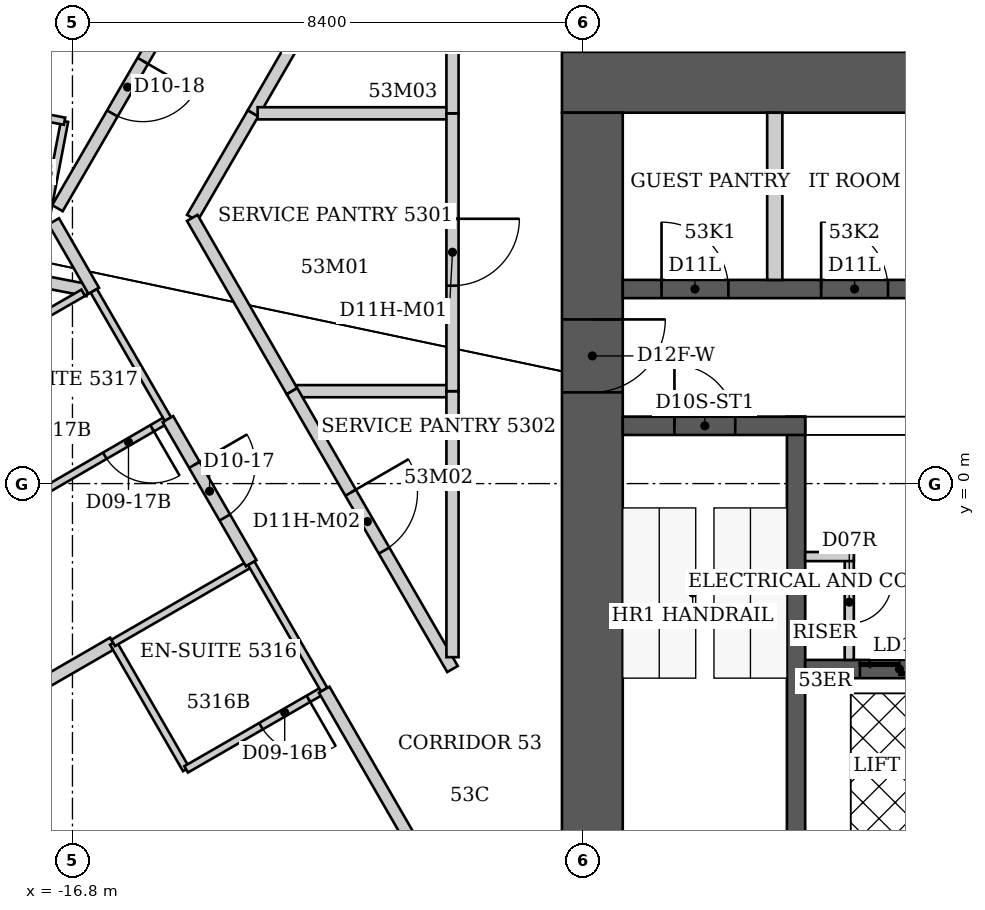
"""IFC4 building model, lengths in metres.
Left out: names, types, materials, properties, quantities, classifications, styles, units other than length and angle.
Written with IfcOpenShell. Run it as: python <this file> out.ifc"""

import sys

from ifc_helpers import new_model, si_unit, direction, frame, frame_2d, origin, place, context, subcontext, project, spatial, rectangle, extrude, element, fill, save


model = new_model("IFC4")
c1 = context("Model", 3, precision=1e-05, world=origin(), true_north=direction((0.0, 1.0)))
c2 = subcontext(c1, "Body", "Model", "MODEL_VIEW")
j1 = project(units=[si_unit("LENGTHUNIT", "METRE"), si_unit("PLANEANGLEUNIT", "RADIAN")], contexts=[c1])
p1 = place(None, origin())
s1 = spatial("IfcSite", under=j1, at=p1, CompositionType="ELEMENT")
p2 = place(p1, origin())
s2 = spatial("IfcBuilding", under=s1, at=p2, CompositionType="ELEMENT")
p3 = place(p2, frame((0.0, 0.0, 213.6)))
s3 = spatial("IfcBuildingStorey", under=s2, at=p3, CompositionType="ELEMENT", Elevation=213.6)
p4 = place(p3, frame((-8.75, 6.6, 0.0), z_axis=(0.0, 0.0, 1.0), x_axis=(1.0, 0.0, 0.0)))
e1 = element("IfcWall", 1, at=p4, inside=s3, PredefinedType="SHEAR", context=c2, shape_type="SweptSolid", body=[
    extrude(rectangle(XDim=17.5, YDim=1.0, at=frame_2d((8.75, 0.0))), origin(), (0.0, 0.0, 1.0), 3.8),
])
p5 = place(p4, frame((6.887, 0.0, 0.0)))
e2 = element("IfcOpeningElement", 2, at=p5, cuts=e1, PredefinedType="OPENING", context=c2, shape_type="SweptSolid", body=[
    extrude(rectangle(XDim=1.1, YDim=2.1, at=frame_2d((0.55, 1.05))), frame((0.0, 0.5, 0.0), z_axis=(0.0, -1.0, 0.0), x_axis=(1.0, 0.0, 0.0)), (0.0, 0.0, 1.0), 1.0),
])
p6 = place(p4, frame((9.512, 0.0, 0.0)))
e3 = element("IfcOpeningElement", 3, at=p6, cuts=e1, PredefinedType="OPENING", context=c2, shape_type="SweptSolid", body=[
    extrude(rectangle(XDim=1.1, YDim=2.1, at=frame_2d((0.55, 1.05))), frame((0.0, 0.5, 0.0), z_axis=(0.0, -1.0, 0.0), x_axis=(1.0, 0.0, 0.0)), (0.0, 0.0, 1.0), 1.0),
])
p7 = place(p4, frame((12.137, 0.0, 0.0)))
e4 = element("IfcOpeningElement", 4, at=p7, cuts=e1, PredefinedType="OPENING", context=c2, shape_type="SweptSolid", body=[
    extrude(rectangle(XDim=1.1, YDim=2.1, at=frame_2d((0.55, 1.05))), frame((0.0, 0.5, 0.0), z_axis=(0.0, -1.0, 0.0), x_axis=(1.0, 0.0, 0.0)), (0.0, 0.0, 1.0), 1.0),
])
p8 = place(p4, frame((14.762, 0.0, 0.0)))
e5 = element("IfcOpeningElement", 5, at=p8, cuts=e1, PredefinedType="OPENING", context=c2, shape_type="SweptSolid", body=[
    extrude(rectangle(XDim=1.1, YDim=2.1, at=frame_2d((0.55, 1.05))), frame((0.0, 0.5, 0.0), z_axis=(0.0, -1.0, 0.0), x_axis=(1.0, 0.0, 0.0)), (0.0, 0.0, 1.0), 1.0),
])
p9 = place(p3, frame((-8.25, -6.1, 0.0), z_axis=(0.0, 0.0, 1.0), x_axis=(0.0, 1.0, 0.0)))
e6 = element("IfcWall", 6, at=p9, inside=s3, PredefinedType="SHEAR", context=c2, shape_type="SweptSolid", body=[
    extrude(rectangle(XDim=12.2, YDim=1.0, at=frame_2d((6.1, 0.0))), origin(), (0.0, 0.0, 1.0), 3.8),
])
p10 = place(p9, frame((7.6, 0.0, 0.0)))
e7 = element("IfcOpeningElement", 7, at=p10, cuts=e6, PredefinedType="OPENING", context=c2, shape_type="SweptSolid", body=[
    extrude(rectangle(XDim=1.2, YDim=2.2, at=frame_2d((0.6, 1.1))), frame((0.0, 0.5, 0.0), z_axis=(0.0, -1.0, 0.0), x_axis=(1.0, 0.0, 0.0)), (0.0, 0.0, 1.0), 1.0),
])
p11 = place(p3, frame((-4.9, -6.1, 0.0), z_axis=(0.0, 0.0, 1.0), x_axis=(0.0, 1.0, 0.0)))
e8 = element("IfcWall", 8, at=p11, inside=s3, PredefinedType="SHEAR", context=c2, shape_type="SweptSolid", body=[
    extrude(rectangle(XDim=7.2, YDim=0.3, at=frame_2d((3.6, 0.0))), origin(), (0.0, 0.0, 1.0), 3.8),
])
p12 = place(p3, frame((-7.75, 0.95, 0.0), z_axis=(0.0, 0.0, 1.0), x_axis=(1.0, 0.0, 0.0)))
e9 = element("IfcWall", 9, at=p12, inside=s3, PredefinedType="SHEAR", context=c2, shape_type="SweptSolid", body=[
    extrude(rectangle(XDim=3.0, YDim=0.3, at=frame_2d((1.5, 0.0))), origin(), (0.0, 0.0, 1.0), 3.8),
])
p13 = place(p12, frame((0.85, 0.0, 0.0)))
e10 = element("IfcOpeningElement", 10, at=p13, cuts=e9, PredefinedType="OPENING", context=c2, shape_type="SweptSolid", body=[
    extrude(rectangle(XDim=1.0, YDim=2.2, at=frame_2d((0.5, 1.1))), frame((0.0, 0.15, 0.0), z_axis=(0.0, -1.0, 0.0), x_axis=(1.0, 0.0, 0.0)), (0.0, 0.0, 1.0), 0.3),
])
p14 = place(p3, frame((-4.75, -3.05, 0.0), z_axis=(0.0, 0.0, 1.0), x_axis=(1.0, 0.0, 0.0)))
e11 = element("IfcWall", 11, at=p14, inside=s3, PredefinedType="SHEAR", context=c2, shape_type="SweptSolid", body=[
    extrude(rectangle(XDim=3.1, YDim=0.3, at=frame_2d((1.55, 0.0))), origin(), (0.0, 0.0, 1.0), 3.8),
])
p15 = place(p14, frame((0.9, 0.0, 0.0)))
e12 = element("IfcOpeningElement", 12, at=p15, cuts=e11, PredefinedType="OPENING", context=c2, shape_type="SweptSolid", body=[
    extrude(rectangle(XDim=1.3, YDim=2.1, at=frame_2d((0.65, 1.05))), frame((0.0, 0.15, 0.0), z_axis=(0.0, -1.0, 0.0), x_axis=(1.0, 0.0, 0.0)), (0.0, 0.0, 1.0), 0.3),
])
p16 = place(p3, frame((-7.75, 3.2, 0.0), z_axis=(0.0, 0.0, 1.0), x_axis=(1.0, 0.0, 0.0)))
e13 = element("IfcWall", 13, at=p16, inside=s3, PredefinedType="SHEAR", context=c2, shape_type="SweptSolid", body=[
    extrude(rectangle(XDim=15.5, YDim=0.3, at=frame_2d((7.75, 0.0))), origin(), (0.0, 0.0, 1.0), 3.8),
])
p17 = place(p16, frame((0.637, 0.0, 0.0)))
e14 = element("IfcOpeningElement", 14, at=p17, cuts=e13, PredefinedType="OPENING", context=c2, shape_type="SweptSolid", body=[
    extrude(rectangle(XDim=1.1, YDim=2.2, at=frame_2d((0.55, 1.1))), frame((0.0, 0.15, 0.0), z_axis=(0.0, -1.0, 0.0), x_axis=(1.0, 0.0, 0.0)), (0.0, 0.0, 1.0), 0.3),
])
p18 = place(p16, frame((3.262, 0.0, 0.0)))
e15 = element("IfcOpeningElement", 15, at=p18, cuts=e13, PredefinedType="OPENING", context=c2, shape_type="SweptSolid", body=[
    extrude(rectangle(XDim=1.1, YDim=2.2, at=frame_2d((0.55, 1.1))), frame((0.0, 0.15, 0.0), z_axis=(0.0, -1.0, 0.0), x_axis=(1.0, 0.0, 0.0)), (0.0, 0.0, 1.0), 0.3),
])
p19 = place(p3, frame((-5.25, 3.35, 0.0), z_axis=(0.0, 0.0, 1.0), x_axis=(0.0, 1.0, 0.0)))
e16 = element("IfcWall", 16, at=p19, inside=s3, PredefinedType="PARTITIONING", context=c2, shape_type="SweptSolid", body=[
    extrude(rectangle(XDim=2.75, YDim=0.25, at=frame_2d((1.375, 0.0))), origin(), (0.0, 0.0, 1.0), 3.8),
])
p20 = place(p3, frame((-21.116, -5.5, 0.0), z_axis=(0.0, 0.0, 1.0), x_axis=(0.865919350456, 0.50018364478, 0.0)))
e17 = element("IfcWall", 17, at=p20, inside=s3, PredefinedType="PARTITIONING", context=c2, shape_type="SweptSolid", body=[
    extrude(rectangle(XDim=5.758, YDim=0.2, at=frame_2d((2.879, 0.0))), origin(), (0.0, 0.0, 1.0), 3.64),
])
p21 = place(p3, frame((-17.54, -0.28, 0.0), z_axis=(0.0, 0.0, 1.0), x_axis=(0.86498992408, 0.501789229896, 0.0)))
e18 = element("IfcWall", 18, at=p21, inside=s3, PredefinedType="PARTITIONING", context=c2, shape_type="SweptSolid", body=[
    extrude(rectangle(XDim=2.671, YDim=0.12, at=frame_2d((1.335, 0.0))), origin(), (0.0, 0.0, 1.0), 3.64),
])
p22 = place(p21, frame((1.47, 0.0, 0.0)))
e19 = element("IfcOpeningElement", 19, at=p22, cuts=e18, PredefinedType="OPENING", context=c2, shape_type="SweptSolid", body=[
    extrude(rectangle(XDim=0.9, YDim=2.03, at=frame_2d((0.45, 1.015))), frame((0.0, 0.06, 0.0), z_axis=(0.0, -1.0, 0.0), x_axis=(1.0, 0.0, 0.0)), (0.0, 0.0, 1.0), 0.12),
])
p23 = place(p3, frame((-17.43, 3.35, 0.0), z_axis=(0.0, 0.0, 1.0), x_axis=(0.188159009227, 0.982138578433, 0.0)))
e20 = element("IfcWall", 20, at=p23, inside=s3, PredefinedType="PARTITIONING", context=c2, shape_type="SweptSolid", body=[
    extrude(rectangle(XDim=2.657, YDim=0.12, at=frame_2d((1.329, 0.0))), origin(), (0.0, 0.0, 1.0), 3.64),
])
p24 = place(p3, frame((-17.43, 3.35, 0.0), z_axis=(0.0, 0.0, 1.0), x_axis=(0.981858463983, -0.189615286052, 0.0)))
e21 = element("IfcWall", 21, at=p24, inside=s3, PredefinedType="PARTITIONING", context=c2, shape_type="SweptSolid", body=[
    extrude(rectangle(XDim=0.896, YDim=0.2, at=frame_2d((0.448, 0.0))), origin(), (0.0, 0.0, 1.0), 3.64),
])
p25 = place(p3, frame((-17.108, 4.314, 0.0), z_axis=(0.0, 0.0, 1.0), x_axis=(0.498488506644, -0.866896307954, 0.0)))
e22 = element("IfcWall", 22, at=p25, inside=s3, PredefinedType="PARTITIONING", context=c2, shape_type="SweptSolid", body=[
    extrude(rectangle(XDim=1.319, YDim=0.2, at=frame_2d((0.66, 0.0))), origin(), (0.0, 0.0, 1.0), 3.64),
])
p26 = place(p3, frame((-16.93, 5.96, 0.0), z_axis=(0.0, 0.0, 1.0), x_axis=(-0.982097071605, 0.18837553436, 0.0)))
e23 = element("IfcWall", 23, at=p26, inside=s3, PredefinedType="PARTITIONING", context=c2, shape_type="SweptSolid", body=[
    extrude(rectangle(XDim=2.495, YDim=0.12, at=frame_2d((1.248, 0.0))), origin(), (0.0, 0.0, 1.0), 3.64),
])
p27 = place(p3, frame((-16.624, 3.138, 0.0), z_axis=(0.0, 0.0, 1.0), x_axis=(-0.866525185869, -0.499133351175, 0.0)))
e24 = element("IfcWall", 24, at=p27, inside=s3, PredefinedType="PARTITIONING", context=c2, shape_type="SweptSolid", body=[
    extrude(rectangle(XDim=2.5, YDim=0.12, at=frame_2d((1.25, 0.0))), origin(), (0.0, 0.0, 1.0), 3.038),
])
p28 = place(p3, frame((-16.45, 3.17, 0.0), z_axis=(0.0, 0.0, 1.0), x_axis=(0.500566296323, -0.865698205488, 0.0)))
e25 = element("IfcWall", 25, at=p28, inside=s3, PredefinedType="PARTITIONING", context=c2, shape_type="SweptSolid", body=[
    extrude(rectangle(XDim=2.437, YDim=0.12, at=frame_2d((1.219, 0.0))), origin(), (0.0, 0.0, 1.0), 3.64),
])
p29 = place(p3, frame((-16.13, -2.62, 0.0), z_axis=(0.0, 0.0, 1.0), x_axis=(0.499737123639, -0.866177122335, 0.0)))
e26 = element("IfcWall", 26, at=p29, inside=s3, PredefinedType="PARTITIONING", context=c2, shape_type="SweptSolid", body=[
    extrude(rectangle(XDim=2.401, YDim=0.12, at=frame_2d((1.201, 0.0))), origin(), (0.0, 0.0, 1.0), 3.64),
])
p30 = place(p3, frame((-16.13, -2.62, 0.0), z_axis=(0.0, 0.0, 1.0), x_axis=(0.866114241029, 0.499846097802, 0.0)))
e27 = element("IfcWall", 27, at=p30, inside=s3, PredefinedType="PARTITIONING", context=c2, shape_type="SweptSolid", body=[
    extrude(rectangle(XDim=2.621, YDim=0.12, at=frame_2d((1.311, 0.0))), origin(), (0.0, 0.0, 1.0), 3.64),
])
p31 = place(p3, frame((-15.23, 1.06, 0.0), z_axis=(0.0, 0.0, 1.0), x_axis=(0.500406860043, -0.865790375565, 0.0)))
e28 = element("IfcWall", 28, at=p31, inside=s3, PredefinedType="PARTITIONING", context=c2, shape_type="SweptSolid", body=[
    extrude(rectangle(XDim=2.738, YDim=0.2, at=frame_2d((1.369, 0.0))), origin(), (0.0, 0.0, 1.0), 3.64),
])
p32 = place(p31, frame((0.869, 0.0, 0.0)))
e29 = element("IfcOpeningElement", 29, at=p32, cuts=e28, PredefinedType="OPENING", context=c2, shape_type="SweptSolid", body=[
    extrude(rectangle(XDim=1.0, YDim=2.13, at=frame_2d((0.5, 1.065))), frame((0.0, 0.1, 0.0), z_axis=(0.0, -1.0, 0.0), x_axis=(1.0, 0.0, 0.0)), (0.0, 0.0, 1.0), 0.2),
])
p33 = place(p3, frame((-14.93, -4.7, 0.0), z_axis=(0.0, 0.0, 1.0), x_axis=(0.866114241029, 0.499846097802, 0.0)))
e30 = element("IfcWall", 30, at=p33, inside=s3, PredefinedType="PARTITIONING", context=c2, shape_type="SweptSolid", body=[
    extrude(rectangle(XDim=2.621, YDim=0.12, at=frame_2d((1.311, 0.0))), origin(), (0.0, 0.0, 1.0), 3.64),
])
p34 = place(p33, frame((1.421, 0.0, 0.0)))
e31 = element("IfcOpeningElement", 31, at=p34, cuts=e30, PredefinedType="OPENING", context=c2, shape_type="SweptSolid", body=[
    extrude(rectangle(XDim=0.9, YDim=2.03, at=frame_2d((0.45, 1.015))), frame((0.0, 0.06, 0.0), z_axis=(0.0, -1.0, 0.0), x_axis=(1.0, 0.0, 0.0)), (0.0, 0.0, 1.0), 0.12),
])
p35 = place(p3, frame((-14.83, 4.37, 0.0), z_axis=(0.0, 0.0, 1.0), x_axis=(0.502626855825, 0.864503466623, 0.0)))
e32 = element("IfcWall", 32, at=p35, inside=s3, PredefinedType="PARTITIONING", context=c2, shape_type="SweptSolid", body=[
    extrude(rectangle(XDim=1.99, YDim=0.2, at=frame_2d((0.995, 0.0))), origin(), (0.0, 0.0, 1.0), 3.64),
])
p36 = place(p3, frame((-14.74, 8.51, 0.0), z_axis=(0.0, 0.0, 1.0), x_axis=(-0.501513165407, -0.865150012959, 0.0)))
e33 = element("IfcWall", 33, at=p36, inside=s3, PredefinedType="PARTITIONING", context=c2, shape_type="SweptSolid", body=[
    extrude(rectangle(XDim=4.6, YDim=0.2, at=frame_2d((2.3, 0.0))), origin(), (0.0, 0.0, 1.0), 3.64),
])
p37 = place(p36, frame((1.8, 0.0, 0.0)))
e34 = element("IfcOpeningElement", 34, at=p37, cuts=e33, PredefinedType="OPENING", context=c2, shape_type="SweptSolid", body=[
    extrude(rectangle(XDim=1.0, YDim=2.13, at=frame_2d((0.5, 1.065))), frame((0.0, 0.1, 0.0), z_axis=(0.0, -1.0, 0.0), x_axis=(1.0, 0.0, 0.0)), (0.0, 0.0, 1.0), 0.2),
])
p38 = place(p3, frame((-13.86, -1.31, 0.0), z_axis=(0.0, 0.0, 1.0), x_axis=(0.499813401482, -0.866133109688, 0.0)))
e35 = element("IfcWall", 35, at=p38, inside=s3, PredefinedType="PARTITIONING", context=c2, shape_type="SweptSolid", body=[
    extrude(rectangle(XDim=2.401, YDim=0.12, at=frame_2d((1.201, 0.0))), origin(), (0.0, 0.0, 1.0), 3.64),
])
p39 = place(p3, frame((-13.83, 6.09, 0.0), z_axis=(0.0, 0.0, 1.0), x_axis=(0.500248310865, 0.865881993967, 0.0)))
e36 = element("IfcWall", 36, at=p39, inside=s3, PredefinedType="PARTITIONING", context=c2, shape_type="SweptSolid", body=[
    extrude(rectangle(XDim=5.278, YDim=0.2, at=frame_2d((2.639, 0.0))), origin(), (0.0, 0.0, 1.0), 3.64),
])
p40 = place(p3, frame((-13.755, 6.09, 0.0), z_axis=(0.0, 0.0, 1.0), x_axis=(1.0, 0.0, 0.0)))
e37 = element("IfcWall", 37, at=p40, inside=s3, PredefinedType="PARTITIONING", context=c2, shape_type="SweptSolid", body=[
    extrude(rectangle(XDim=3.195, YDim=0.2, at=frame_2d((1.597, 0.0))), origin(), (0.0, 0.0, 1.0), 3.64),
])
p41 = place(p3, frame((-13.19, 1.52, 0.0), z_axis=(0.0, 0.0, 1.0), x_axis=(-0.498775186059, 0.866731396554, 0.0)))
e38 = element("IfcWall", 38, at=p41, inside=s3, PredefinedType="PARTITIONING", context=c2, shape_type="SweptSolid", body=[
    extrude(rectangle(XDim=3.288, YDim=0.2, at=frame_2d((1.644, 0.0))), origin(), (0.0, 0.0, 1.0), 3.64),
])
p42 = place(p3, frame((-12.66, -3.39, 0.0), z_axis=(0.0, 0.0, 1.0), x_axis=(0.499511590934, -0.866307203319, 0.0)))
e39 = element("IfcWall", 39, at=p42, inside=s3, PredefinedType="PARTITIONING", context=c2, shape_type="SweptSolid", body=[
    extrude(rectangle(XDim=9.189, YDim=0.2, at=frame_2d((4.594, 0.0))), origin(), (0.0, 0.0, 1.0), 3.64),
])
p43 = place(p42, frame((4.094, 0.0, 0.0)))
e40 = element("IfcOpeningElement", 40, at=p43, cuts=e39, PredefinedType="OPENING", context=c2, shape_type="SweptSolid", body=[
    extrude(rectangle(XDim=1.0, YDim=2.13, at=frame_2d((0.5, 1.065))), frame((0.0, 0.1, 0.0), z_axis=(0.0, -1.0, 0.0), x_axis=(1.0, 0.0, 0.0)), (0.0, 0.0, 1.0), 0.2),
])
p44 = place(p3, frame((-10.56, 1.52, 0.0), z_axis=(0.0, 0.0, 1.0), x_axis=(-1.0, 0.0, 0.0)))
e41 = element("IfcWall", 41, at=p44, inside=s3, PredefinedType="PARTITIONING", context=c2, shape_type="SweptSolid", body=[
    extrude(rectangle(XDim=2.56, YDim=0.2, at=frame_2d((1.28, 0.0))), origin(), (0.0, 0.0, 1.0), 3.64),
])
p45 = place(p3, frame((-10.55, -3.05, 0.0), z_axis=(0.0, 0.0, 1.0), x_axis=(-0.500193590286, 0.865913605527, 0.0)))
e42 = element("IfcWall", 42, at=p45, inside=s3, PredefinedType="PARTITIONING", context=c2, shape_type="SweptSolid", body=[
    extrude(rectangle(XDim=5.278, YDim=0.2, at=frame_2d((2.639, 0.0))), origin(), (0.0, 0.0, 1.0), 3.64),
])
p46 = place(p45, frame((2.25, 0.0, 0.0)))
e43 = element("IfcOpeningElement", 43, at=p46, cuts=e42, PredefinedType="OPENING", context=c2, shape_type="SweptSolid", body=[
    extrude(rectangle(XDim=1.1, YDim=2.2, at=frame_2d((0.55, 1.1))), frame((0.0, 0.1, 0.0), z_axis=(0.0, -1.0, 0.0), x_axis=(1.0, 0.0, 0.0)), (0.0, 0.0, 1.0), 0.2),
])
p47 = place(p3, frame((-10.55, 1.52, 0.0), z_axis=(0.0, 0.0, 1.0), x_axis=(0.0, -1.0, 0.0)))
e44 = element("IfcWall", 44, at=p47, inside=s3, PredefinedType="PARTITIONING", context=c2, shape_type="SweptSolid", body=[
    extrude(rectangle(XDim=4.375, YDim=0.2, at=frame_2d((2.188, 0.0))), origin(), (0.0, 0.0, 1.0), 3.64),
])
p48 = place(p3, frame((-10.55, 6.09, 0.0), z_axis=(0.0, 0.0, 1.0), x_axis=(0.0, -1.0, 0.0)))
e45 = element("IfcWall", 45, at=p48, inside=s3, PredefinedType="PARTITIONING", context=c2, shape_type="SweptSolid", body=[
    extrude(rectangle(XDim=4.57, YDim=0.2, at=frame_2d((2.285, 0.0))), origin(), (0.0, 0.0, 1.0), 3.64),
])
p49 = place(p48, frame((1.735, 0.0, 0.0)))
e46 = element("IfcOpeningElement", 46, at=p49, cuts=e45, PredefinedType="OPENING", context=c2, shape_type="SweptSolid", body=[
    extrude(rectangle(XDim=1.1, YDim=2.2, at=frame_2d((0.55, 1.1))), frame((0.0, 0.1, 0.0), z_axis=(0.0, -1.0, 0.0), x_axis=(1.0, 0.0, 0.0)), (0.0, 0.0, 1.0), 0.2),
])
p50 = place(p3, frame((-10.55, 8.89, 0.0), z_axis=(0.0, 0.0, 1.0), x_axis=(0.0, -1.0, 0.0)))
e47 = element("IfcWall", 47, at=p50, inside=s3, PredefinedType="PARTITIONING", context=c2, shape_type="SweptSolid", body=[
    extrude(rectangle(XDim=2.8, YDim=0.2, at=frame_2d((1.4, 0.0))), origin(), (0.0, 0.0, 1.0), 3.64),
])
p51 = place(p3, frame((-4.025, -2.9, 0.0), z_axis=(0.0, 0.0, 1.0), x_axis=(0.0, 1.0, 0.0)))
e48 = element("IfcWall", 48, at=p51, inside=s3, PredefinedType="PARTITIONING", context=c2, shape_type="SweptSolid", body=[
    extrude(rectangle(XDim=1.775, YDim=0.15, at=frame_2d((0.887, 0.0))), origin(), (0.0, 0.0, 1.0), 3.64),
])
p52 = place(p51, frame((0.6, 0.0, 0.0)))
e49 = element("IfcOpeningElement", 49, at=p52, cuts=e48, PredefinedType="OPENING", context=c2, shape_type="SweptSolid", body=[
    extrude(rectangle(XDim=0.7, YDim=2.1, at=frame_2d((0.35, 1.05))), frame((0.0, 0.075, 0.0), z_axis=(0.0, -1.0, 0.0), x_axis=(1.0, 0.0, 0.0)), (0.0, 0.0, 1.0), 0.15),
])
p53 = place(p3, frame((-4.75, -1.2, 0.0), z_axis=(0.0, 0.0, 1.0), x_axis=(1.0, 0.0, 0.0)))
e50 = element("IfcWall", 50, at=p53, inside=s3, PredefinedType="PARTITIONING", context=c2, shape_type="SweptSolid", body=[
    extrude(rectangle(XDim=0.8, YDim=0.15, at=frame_2d((0.4, 0.0))), origin(), (0.0, 0.0, 1.0), 3.64),
])
p54 = place(p34, origin())
e51 = element("IfcDoor", 51, at=p54, inside=s3, OperationType="SINGLE_SWING_RIGHT", PredefinedType="DOOR", context=c2, shape_type="SweptSolid", body=[
    extrude(rectangle(XDim=0.9, YDim=2.03, at=frame_2d((0.45, 1.015))), frame((0.0, 0.025, 0.0), z_axis=(0.0, -1.0, 0.0), x_axis=(1.0, 0.0, 0.0)), (0.0, 0.0, 1.0), 0.05),
])
fill(e31, e51)
p55 = place(p32, origin())
e52 = element("IfcDoor", 52, at=p55, inside=s3, OperationType="SINGLE_SWING_LEFT", PredefinedType="DOOR", context=c2, shape_type="SweptSolid", body=[
    extrude(rectangle(XDim=1.0, YDim=2.13, at=frame_2d((0.5, 1.065))), frame((0.0, 0.025, 0.0), z_axis=(0.0, -1.0, 0.0), x_axis=(1.0, 0.0, 0.0)), (0.0, 0.0, 1.0), 0.05),
])
fill(e29, e52)
p56 = place(p22, origin())
e53 = element("IfcDoor", 53, at=p56, inside=s3, OperationType="SINGLE_SWING_RIGHT", PredefinedType="DOOR", context=c2, shape_type="SweptSolid", body=[
    extrude(rectangle(XDim=0.9, YDim=2.03, at=frame_2d((0.45, 1.015))), frame((0.0, 0.025, 0.0), z_axis=(0.0, -1.0, 0.0), x_axis=(1.0, 0.0, 0.0)), (0.0, 0.0, 1.0), 0.05),
])
fill(e19, e53)
p57 = place(p37, origin())
e54 = element("IfcDoor", 54, at=p57, inside=s3, OperationType="SINGLE_SWING_LEFT", PredefinedType="DOOR", context=c2, shape_type="SweptSolid", body=[
    extrude(rectangle(XDim=1.0, YDim=2.13, at=frame_2d((0.5, 1.065))), frame((0.0, 0.025, 0.0), z_axis=(0.0, -1.0, 0.0), x_axis=(1.0, 0.0, 0.0)), (0.0, 0.0, 1.0), 0.05),
])
fill(e34, e54)
p58 = place(p49, origin())
e55 = element("IfcDoor", 55, at=p58, inside=s3, OperationType="SINGLE_SWING_LEFT", PredefinedType="DOOR", context=c2, shape_type="SweptSolid", body=[
    extrude(rectangle(XDim=1.1, YDim=2.2, at=frame_2d((0.55, 1.1))), frame((0.0, 0.025, 0.0), z_axis=(0.0, -1.0, 0.0), x_axis=(1.0, 0.0, 0.0)), (0.0, 0.0, 1.0), 0.05),
])
fill(e46, e55)
p59 = place(p46, origin())
e56 = element("IfcDoor", 56, at=p59, inside=s3, OperationType="SINGLE_SWING_RIGHT", PredefinedType="DOOR", context=c2, shape_type="SweptSolid", body=[
    extrude(rectangle(XDim=1.1, YDim=2.2, at=frame_2d((0.55, 1.1))), frame((0.0, 0.025, 0.0), z_axis=(0.0, -1.0, 0.0), x_axis=(1.0, 0.0, 0.0)), (0.0, 0.0, 1.0), 0.05),
])
fill(e43, e56)
p60 = place(p13, origin())
e57 = element("IfcDoor", 57, at=p60, inside=s3, OperationType="SINGLE_SWING_LEFT", PredefinedType="DOOR", context=c2, shape_type="SweptSolid", body=[
    extrude(rectangle(XDim=1.0, YDim=2.2, at=frame_2d((0.5, 1.1))), frame((0.0, 0.025, 0.0), z_axis=(0.0, -1.0, 0.0), x_axis=(1.0, 0.0, 0.0)), (0.0, 0.0, 1.0), 0.05),
])
fill(e10, e57)
p61 = place(p10, origin())
e58 = element("IfcDoor", 58, at=p61, inside=s3, OperationType="SINGLE_SWING_RIGHT", PredefinedType="DOOR", context=c2, shape_type="SweptSolid", body=[
    extrude(rectangle(XDim=1.2, YDim=2.2, at=frame_2d((0.6, 1.1))), frame((0.0, 0.025, 0.0), z_axis=(0.0, -1.0, 0.0), x_axis=(1.0, 0.0, 0.0)), (0.0, 0.0, 1.0), 0.05),
])
fill(e7, e58)
p62 = place(p52, origin())
e59 = element("IfcDoor", 59, at=p62, inside=s3, OperationType="SINGLE_SWING_RIGHT", PredefinedType="DOOR", context=c2, shape_type="SweptSolid", body=[
    extrude(rectangle(XDim=0.7, YDim=2.1, at=frame_2d((0.35, 1.05))), frame((0.0, 0.025, 0.0), z_axis=(0.0, -1.0, 0.0), x_axis=(1.0, 0.0, 0.0)), (0.0, 0.0, 1.0), 0.05),
])
fill(e49, e59)
p63 = place(p17, origin())
e60 = element("IfcDoor", 60, at=p63, inside=s3, OperationType="SINGLE_SWING_LEFT", PredefinedType="DOOR", context=c2, shape_type="SweptSolid", body=[
    extrude(rectangle(XDim=1.1, YDim=2.2, at=frame_2d((0.55, 1.1))), frame((0.0, 0.025, 0.0), z_axis=(0.0, -1.0, 0.0), x_axis=(1.0, 0.0, 0.0)), (0.0, 0.0, 1.0), 0.05),
])
fill(e14, e60)
p64 = place(p18, origin())
e61 = element("IfcDoor", 61, at=p64, inside=s3, OperationType="SINGLE_SWING_LEFT", PredefinedType="DOOR", context=c2, shape_type="SweptSolid", body=[
    extrude(rectangle(XDim=1.1, YDim=2.2, at=frame_2d((0.55, 1.1))), frame((0.0, 0.025, 0.0), z_axis=(0.0, -1.0, 0.0), x_axis=(1.0, 0.0, 0.0)), (0.0, 0.0, 1.0), 0.05),
])
fill(e15, e61)
p65 = place(p15, origin())
e62 = element("IfcDoor", 62, at=p65, inside=s3, OperationType="DOUBLE_DOOR_SLIDING", PredefinedType="DOOR", context=c2, shape_type="SweptSolid", body=[
    extrude(rectangle(XDim=1.3, YDim=2.1, at=frame_2d((0.65, 1.05))), frame((0.0, 0.025, 0.0), z_axis=(0.0, -1.0, 0.0), x_axis=(1.0, 0.0, 0.0)), (0.0, 0.0, 1.0), 0.05),
])
fill(e12, e62)
save(model, sys.argv[1])
